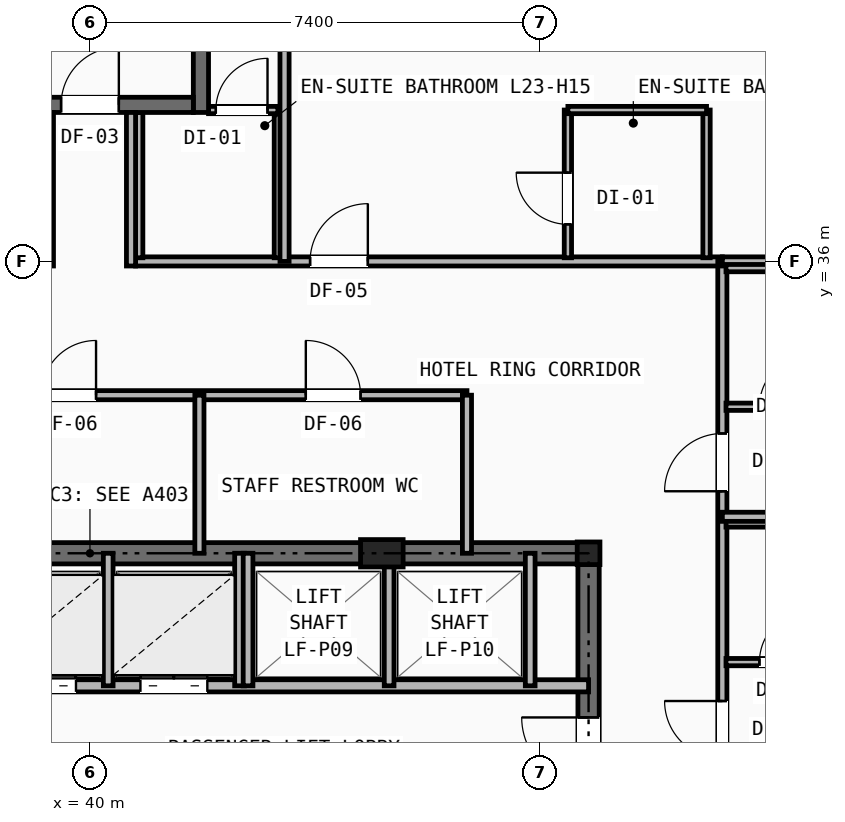
"""IFC4 building model, lengths in metres.
Left out: names, types, materials, properties, quantities, classifications, styles, units other than length and angle.
Written with IfcOpenShell. Run it as: python <this file> out.ifc"""

import sys

from ifc_helpers import new_model, si_unit, direction, frame, frame_2d, origin, origin_2d, place, context, subcontext, project, spatial, rectangle, i_section, extrude, element, fill, save


model = new_model("IFC4")
c1 = context("Model", 3, precision=1e-05, world=origin(), true_north=direction((0.0, 1.0)))
c2 = subcontext(c1, "Body", "Model", "MODEL_VIEW")
j1 = project(units=[si_unit("LENGTHUNIT", "METRE"), si_unit("PLANEANGLEUNIT", "RADIAN")], contexts=[c1])
p1 = place(None, origin())
s1 = spatial("IfcSite", under=j1, at=p1, CompositionType="ELEMENT")
p2 = place(p1, origin())
s2 = spatial("IfcBuilding", under=s1, at=p2, CompositionType="ELEMENT")
p3 = place(p2, frame((0.0, 0.0, 83.0)))
s3 = spatial("IfcBuildingStorey", under=s2, at=p3, CompositionType="ELEMENT", Elevation=83.0)
p4 = place(p3, frame((48.2, 31.2, 0.0), z_axis=(0.0, 0.0, 1.0), x_axis=(1.0, 0.0, 0.0)))
e1 = element("IfcColumn", 1, at=p4, inside=s3, PredefinedType="COLUMN", context=c2, shape_type="SweptSolid", body=[
    extrude(i_section(OverallWidth=0.374, OverallDepth=0.372, WebThickness=0.016, FlangeThickness=0.026, at=origin_2d()), origin(), (0.0, 0.0, 1.0), 3.2),
])
p5 = place(p3, frame((44.8, 31.2, 0.0), z_axis=(0.0, 0.0, 1.0), x_axis=(1.0, 0.0, 0.0)))
e2 = element("IfcColumn", 2, at=p5, inside=s3, PredefinedType="PILASTER", context=c2, shape_type="SweptSolid", body=[
    extrude(rectangle(XDim=0.7, YDim=0.45, at=origin_2d()), origin(), (0.0, 0.0, 1.0), 3.2),
])
p6 = place(p3, frame((31.8, 31.2, 0.0), z_axis=(0.0, 0.0, 1.0), x_axis=(1.0, 0.0, 0.0)))
e3 = element("IfcWall", 3, at=p6, inside=s3, PredefinedType="SHEAR", context=c2, shape_type="SweptSolid", body=[
    extrude(rectangle(XDim=16.4, YDim=0.35, at=frame_2d((8.2, 0.0))), origin(), (0.0, 0.0, 1.0), 2.97),
])
p7 = place(p3, frame((48.2, 16.4, 0.0), z_axis=(0.0, 0.0, 1.0), x_axis=(0.0, 1.0, 0.0)))
e4 = element("IfcWall", 4, at=p7, inside=s3, PredefinedType="SHEAR", context=c2, shape_type="SweptSolid", body=[
    extrude(rectangle(XDim=14.8, YDim=0.35, at=frame_2d((7.4, 0.0))), origin(), (0.0, 0.0, 1.0), 2.97),
])
p8 = place(p7, frame((11.0, 0.0, 0.0)))
e5 = element("IfcOpeningElement", 5, at=p8, cuts=e4, PredefinedType="OPENING", context=c2, shape_type="SweptSolid", body=[
    extrude(rectangle(XDim=1.1, YDim=2.15, at=frame_2d((0.55, 1.075))), frame((0.0, 0.185, 0.0), z_axis=(0.0, -1.0, 0.0), x_axis=(1.0, 0.0, 0.0)), (0.0, 0.0, 1.0), 0.37),
])
p9 = place(p3, frame((31.8, 29.02, 0.0), z_axis=(0.0, 0.0, 1.0), x_axis=(1.0, 0.0, 0.0)))
e6 = element("IfcWall", 6, at=p9, inside=s3, PredefinedType="SOLIDWALL", context=c2, shape_type="SweptSolid", body=[
    extrude(rectangle(XDim=16.4, YDim=0.2, at=frame_2d((8.2, 0.0))), origin(), (0.0, 0.0, 1.0), 2.421),
])
p10 = place(p9, frame((0.55, 0.0, 0.0)))
e7 = element("IfcOpeningElement", 7, at=p10, cuts=e6, PredefinedType="OPENING", context=c2, shape_type="SweptSolid", body=[
    extrude(rectangle(XDim=0.85, YDim=2.05, at=frame_2d((0.425, 1.025))), frame((0.0, 0.11, 0.0), z_axis=(0.0, -1.0, 0.0), x_axis=(1.0, 0.0, 0.0)), (0.0, 0.0, 1.0), 0.22),
])
p11 = place(p9, frame((2.55, 0.0, 0.0)))
e8 = element("IfcOpeningElement", 8, at=p11, cuts=e6, PredefinedType="OPENING", context=c2, shape_type="SweptSolid", body=[
    extrude(rectangle(XDim=1.1, YDim=2.15, at=frame_2d((0.55, 1.075))), frame((0.0, 0.11, 0.0), z_axis=(0.0, -1.0, 0.0), x_axis=(1.0, 0.0, 0.0)), (0.0, 0.0, 1.0), 0.22),
])
p12 = place(p9, frame((4.71, 0.0, 0.0)))
e9 = element("IfcOpeningElement", 9, at=p12, cuts=e6, PredefinedType="OPENING", context=c2, shape_type="SweptSolid", body=[
    extrude(rectangle(XDim=1.1, YDim=2.15, at=frame_2d((0.55, 1.075))), frame((0.0, 0.11, 0.0), z_axis=(0.0, -1.0, 0.0), x_axis=(1.0, 0.0, 0.0)), (0.0, 0.0, 1.0), 0.22),
])
p13 = place(p9, frame((6.87, 0.0, 0.0)))
e10 = element("IfcOpeningElement", 10, at=p13, cuts=e6, PredefinedType="OPENING", context=c2, shape_type="SweptSolid", body=[
    extrude(rectangle(XDim=1.1, YDim=2.15, at=frame_2d((0.55, 1.075))), frame((0.0, 0.11, 0.0), z_axis=(0.0, -1.0, 0.0), x_axis=(1.0, 0.0, 0.0)), (0.0, 0.0, 1.0), 0.22),
])
p14 = place(p9, frame((9.03, 0.0, 0.0)))
e11 = element("IfcOpeningElement", 11, at=p14, cuts=e6, PredefinedType="OPENING", context=c2, shape_type="SweptSolid", body=[
    extrude(rectangle(XDim=1.1, YDim=2.15, at=frame_2d((0.55, 1.075))), frame((0.0, 0.11, 0.0), z_axis=(0.0, -1.0, 0.0), x_axis=(1.0, 0.0, 0.0)), (0.0, 0.0, 1.0), 0.22),
])
for number, where, z_axis, x_axis in (
    (12, (40.3, 29.02, 0.0), (0.0, 0.0, 1.0), (0.0, 1.0, 0.0)),
    (13, (42.46, 29.02, 0.0), (0.0, 0.0, 1.0), (0.0, 1.0, 0.0)),
    (14, (42.6, 29.02, 0.0), (0.0, 0.0, 1.0), (0.0, 1.0, 0.0)),
    (15, (44.92, 29.02, 0.0), (0.0, 0.0, 1.0), (0.0, 1.0, 0.0)),
    (16, (47.24, 29.02, 0.0), (0.0, 0.0, 1.0), (0.0, 1.0, 0.0)),
):
    element("IfcWall", number, at=place(p3, frame(where, z_axis=z_axis, x_axis=x_axis)), inside=s3, PredefinedType="SOLIDWALL", context=c2, shape_type="SweptSolid", body=[
        extrude(rectangle(XDim=2.18, YDim=0.16, at=frame_2d((1.09, 0.0))), origin(), (0.0, 0.0, 1.0), 2.421),
    ])
p15 = place(p3, frame((33.2, 33.8, 0.0), z_axis=(0.0, 0.0, 1.0), x_axis=(1.0, 0.0, 0.0)))
e17 = element("IfcWall", 17, at=p15, inside=s3, PredefinedType="PARTITIONING", context=c2, shape_type="SweptSolid", body=[
    extrude(rectangle(XDim=13.0, YDim=0.15, at=frame_2d((6.5, 0.0))), origin(), (0.0, 0.0, 1.0), 2.97),
])
p16 = place(p15, frame((1.7, 0.0, 0.0)))
e18 = element("IfcOpeningElement", 18, at=p16, cuts=e17, PredefinedType="OPENING", context=c2, shape_type="SweptSolid", body=[
    extrude(rectangle(XDim=0.9, YDim=2.1, at=frame_2d((0.45, 1.05))), frame((0.0, 0.085, 0.0), z_axis=(0.0, -1.0, 0.0), x_axis=(1.0, 0.0, 0.0)), (0.0, 0.0, 1.0), 0.17),
])
p17 = place(p15, frame((6.0, 0.0, 0.0)))
e19 = element("IfcOpeningElement", 19, at=p17, cuts=e17, PredefinedType="OPENING", context=c2, shape_type="SweptSolid", body=[
    extrude(rectangle(XDim=0.9, YDim=2.1, at=frame_2d((0.45, 1.05))), frame((0.0, 0.085, 0.0), z_axis=(0.0, -1.0, 0.0), x_axis=(1.0, 0.0, 0.0)), (0.0, 0.0, 1.0), 0.17),
])
p18 = place(p15, frame((10.35, 0.0, 0.0)))
e20 = element("IfcOpeningElement", 20, at=p18, cuts=e17, PredefinedType="OPENING", context=c2, shape_type="SweptSolid", body=[
    extrude(rectangle(XDim=0.9, YDim=2.1, at=frame_2d((0.45, 1.05))), frame((0.0, 0.085, 0.0), z_axis=(0.0, -1.0, 0.0), x_axis=(1.0, 0.0, 0.0)), (0.0, 0.0, 1.0), 0.17),
])
for number, where, z_axis, x_axis in (
    (21, (46.2, 31.2, 0.0), (0.0, 0.0, 1.0), (0.0, 1.0, 0.0)),
    (22, (41.8, 31.2, 0.0), (0.0, 0.0, 1.0), (0.0, 1.0, 0.0)),
):
    element("IfcWall", number, at=place(p3, frame(where, z_axis=z_axis, x_axis=x_axis)), inside=s3, PredefinedType="PARTITIONING", context=c2, shape_type="SweptSolid", body=[
        extrude(rectangle(XDim=2.6, YDim=0.15, at=frame_2d((1.3, 0.0))), origin(), (0.0, 0.0, 1.0), 2.421),
    ])
p19 = place(p3, frame((40.75, 36.0, 0.0), z_axis=(0.0, 0.0, 1.0), x_axis=(1.0, 0.0, 0.0)))
e23 = element("IfcWall", 23, at=p19, inside=s3, PredefinedType="PARTITIONING", context=c2, shape_type="SweptSolid", body=[
    extrude(rectangle(XDim=9.65, YDim=0.15, at=frame_2d((4.825, 0.0))), origin(), (0.0, 0.0, 1.0), 2.503),
])
p20 = place(p19, frame((2.87, 0.0, 0.0)))
e24 = element("IfcOpeningElement", 24, at=p20, cuts=e23, PredefinedType="OPENING", context=c2, shape_type="SweptSolid", body=[
    extrude(rectangle(XDim=0.95, YDim=2.1, at=frame_2d((0.475, 1.05))), frame((0.0, 0.085, 0.0), z_axis=(0.0, -1.0, 0.0), x_axis=(1.0, 0.0, 0.0)), (0.0, 0.0, 1.0), 0.17),
])
p21 = place(p3, frame((50.4, 14.1, 0.0), z_axis=(0.0, 0.0, 1.0), x_axis=(0.0, 1.0, 0.0)))
e25 = element("IfcWall", 25, at=p21, inside=s3, PredefinedType="PARTITIONING", context=c2, shape_type="SweptSolid", body=[
    extrude(rectangle(XDim=21.9, YDim=0.15, at=frame_2d((10.95, 0.0))), origin(), (0.0, 0.0, 1.0), 2.421),
])
p22 = place(p21, frame((0.42, 0.0, 0.0)))
e26 = element("IfcOpeningElement", 26, at=p22, cuts=e25, PredefinedType="OPENING", context=c2, shape_type="SweptSolid", body=[
    extrude(rectangle(XDim=0.95, YDim=2.1, at=frame_2d((0.475, 1.05))), frame((0.0, 0.085, 0.0), z_axis=(0.0, -1.0, 0.0), x_axis=(1.0, 0.0, 0.0)), (0.0, 0.0, 1.0), 0.17),
])
p23 = place(p21, frame((4.72, 0.0, 0.0)))
e27 = element("IfcOpeningElement", 27, at=p23, cuts=e25, PredefinedType="OPENING", context=c2, shape_type="SweptSolid", body=[
    extrude(rectangle(XDim=0.95, YDim=2.1, at=frame_2d((0.475, 1.05))), frame((0.0, 0.085, 0.0), z_axis=(0.0, -1.0, 0.0), x_axis=(1.0, 0.0, 0.0)), (0.0, 0.0, 1.0), 0.17),
])
p24 = place(p21, frame((9.12, 0.0, 0.0)))
e28 = element("IfcOpeningElement", 28, at=p24, cuts=e25, PredefinedType="OPENING", context=c2, shape_type="SweptSolid", body=[
    extrude(rectangle(XDim=0.95, YDim=2.1, at=frame_2d((0.475, 1.05))), frame((0.0, 0.085, 0.0), z_axis=(0.0, -1.0, 0.0), x_axis=(1.0, 0.0, 0.0)), (0.0, 0.0, 1.0), 0.17),
])
p25 = place(p21, frame((13.72, 0.0, 0.0)))
e29 = element("IfcOpeningElement", 29, at=p25, cuts=e25, PredefinedType="OPENING", context=c2, shape_type="SweptSolid", body=[
    extrude(rectangle(XDim=0.95, YDim=2.1, at=frame_2d((0.475, 1.05))), frame((0.0, 0.085, 0.0), z_axis=(0.0, -1.0, 0.0), x_axis=(1.0, 0.0, 0.0)), (0.0, 0.0, 1.0), 0.17),
])
p26 = place(p21, frame((18.12, 0.0, 0.0)))
e30 = element("IfcOpeningElement", 30, at=p26, cuts=e25, PredefinedType="OPENING", context=c2, shape_type="SweptSolid", body=[
    extrude(rectangle(XDim=0.95, YDim=2.1, at=frame_2d((0.475, 1.05))), frame((0.0, 0.085, 0.0), z_axis=(0.0, -1.0, 0.0), x_axis=(1.0, 0.0, 0.0)), (0.0, 0.0, 1.0), 0.17),
])
p27 = place(p3, frame((50.4, 36.0, 0.0), z_axis=(0.0, 0.0, 1.0), x_axis=(1.0, 0.0, 0.0)))
e31 = element("IfcWall", 31, at=p27, inside=s3, PredefinedType="PARTITIONING", context=c2, shape_type="SweptSolid", body=[
    extrude(rectangle(XDim=5.645, YDim=0.15, at=frame_2d((2.823, 0.0))), origin(), (0.0, 0.0, 1.0), 2.258),
])
p28 = place(p3, frame((50.46, 29.41, 0.0), z_axis=(0.0, 0.0, 1.0), x_axis=(1.0, 0.0, 0.0)))
e32 = element("IfcWall", 32, at=p28, inside=s3, PredefinedType="PARTITIONING", context=c2, shape_type="SweptSolid", body=[
    extrude(rectangle(XDim=2.43, YDim=0.12, at=frame_2d((1.215, 0.0))), origin(), (0.0, 0.0, 1.0), 2.97),
])
p29 = place(p28, frame((0.55, 0.0, 0.0)))
e33 = element("IfcOpeningElement", 33, at=p29, cuts=e32, PredefinedType="OPENING", context=c2, shape_type="SweptSolid", body=[
    extrude(rectangle(XDim=0.85, YDim=2.05, at=frame_2d((0.425, 1.025))), frame((0.0, 0.07, 0.0), z_axis=(0.0, -1.0, 0.0), x_axis=(1.0, 0.0, 0.0)), (0.0, 0.0, 1.0), 0.14),
])
p30 = place(p3, frame((50.46, 31.69, 0.0), z_axis=(0.0, 0.0, 1.0), x_axis=(1.0, 0.0, 0.0)))
e34 = element("IfcWall", 34, at=p30, inside=s3, PredefinedType="PARTITIONING", context=c2, shape_type="SweptSolid", body=[
    extrude(rectangle(XDim=2.43, YDim=0.12, at=frame_2d((1.215, 0.0))), origin(), (0.0, 0.0, 1.0), 2.421),
])
p31 = place(p3, frame((50.4, 31.8, 0.0), z_axis=(0.0, 0.0, 1.0), x_axis=(1.0, 0.0, 0.0)))
e35 = element("IfcWall", 35, at=p31, inside=s3, PredefinedType="PARTITIONING", context=c2, shape_type="SweptSolid", body=[
    extrude(rectangle(XDim=8.046, YDim=0.15, at=frame_2d((4.023, 0.0))), origin(), (0.0, 0.0, 1.0), 2.258),
])
p32 = place(p3, frame((50.46, 33.61, 0.0), z_axis=(0.0, 0.0, 1.0), x_axis=(1.0, 0.0, 0.0)))
e36 = element("IfcWall", 36, at=p32, inside=s3, PredefinedType="PARTITIONING", context=c2, shape_type="SweptSolid", body=[
    extrude(rectangle(XDim=2.43, YDim=0.12, at=frame_2d((1.215, 0.0))), origin(), (0.0, 0.0, 1.0), 2.503),
])
p33 = place(p32, frame((0.55, 0.0, 0.0)))
e37 = element("IfcOpeningElement", 37, at=p33, cuts=e36, PredefinedType="OPENING", context=c2, shape_type="SweptSolid", body=[
    extrude(rectangle(XDim=0.85, YDim=2.05, at=frame_2d((0.425, 1.025))), frame((0.0, 0.07, 0.0), z_axis=(0.0, -1.0, 0.0), x_axis=(1.0, 0.0, 0.0)), (0.0, 0.0, 1.0), 0.14),
])
p34 = place(p3, frame((50.46, 35.89, 0.0), z_axis=(0.0, 0.0, 1.0), x_axis=(1.0, 0.0, 0.0)))
e38 = element("IfcWall", 38, at=p34, inside=s3, PredefinedType="PARTITIONING", context=c2, shape_type="SweptSolid", body=[
    extrude(rectangle(XDim=2.43, YDim=0.12, at=frame_2d((1.215, 0.0))), origin(), (0.0, 0.0, 1.0), 2.97),
])
p35 = place(p3, frame((40.81, 36.06, 0.0), z_axis=(0.0, 0.0, 1.0), x_axis=(0.0, 1.0, 0.0)))
e39 = element("IfcWall", 39, at=p35, inside=s3, PredefinedType="PARTITIONING", context=c2, shape_type="SweptSolid", body=[
    extrude(rectangle(XDim=2.39, YDim=0.12, at=frame_2d((1.195, 0.0))), origin(), (0.0, 0.0, 1.0), 2.97),
])
p36 = place(p3, frame((43.09, 36.06, 0.0), z_axis=(0.0, 0.0, 1.0), x_axis=(0.0, 1.0, 0.0)))
e40 = element("IfcWall", 40, at=p36, inside=s3, PredefinedType="PARTITIONING", context=c2, shape_type="SweptSolid", body=[
    extrude(rectangle(XDim=2.43, YDim=0.12, at=frame_2d((1.215, 0.0))), origin(), (0.0, 0.0, 1.0), 2.97),
])
p37 = place(p3, frame((41.95, 38.49, 0.0), z_axis=(0.0, 0.0, 1.0), x_axis=(1.0, 0.0, 0.0)))
e41 = element("IfcWall", 41, at=p37, inside=s3, PredefinedType="PARTITIONING", context=c2, shape_type="SweptSolid", body=[
    extrude(rectangle(XDim=1.14, YDim=0.12, at=frame_2d((0.57, 0.0))), origin(), (0.0, 0.0, 1.0), 2.97),
])
p38 = place(p37, frame((0.12, 0.0, 0.0)))
e42 = element("IfcOpeningElement", 42, at=p38, cuts=e41, PredefinedType="OPENING", context=c2, shape_type="SweptSolid", body=[
    extrude(rectangle(XDim=0.85, YDim=2.05, at=frame_2d((0.425, 1.025))), frame((0.0, 0.07, 0.0), z_axis=(0.0, -1.0, 0.0), x_axis=(1.0, 0.0, 0.0)), (0.0, 0.0, 1.0), 0.14),
])
p39 = place(p3, frame((43.2, 36.0, 0.0), z_axis=(0.0, 0.0, 1.0), x_axis=(0.0, 1.0, 0.0)))
e43 = element("IfcWall", 43, at=p39, inside=s3, PredefinedType="PARTITIONING", context=c2, shape_type="SweptSolid", body=[
    extrude(rectangle(XDim=17.746, YDim=0.15, at=frame_2d((8.873, 0.0))), origin(), (0.0, 0.0, 1.0), 2.258),
])
p40 = place(p3, frame((47.86, 36.06, 0.0), z_axis=(0.0, 0.0, 1.0), x_axis=(0.0, 1.0, 0.0)))
e44 = element("IfcWall", 44, at=p40, inside=s3, PredefinedType="PARTITIONING", context=c2, shape_type="SweptSolid", body=[
    extrude(rectangle(XDim=2.43, YDim=0.12, at=frame_2d((1.215, 0.0))), origin(), (0.0, 0.0, 1.0), 2.503),
])
p41 = place(p40, frame((0.55, 0.0, 0.0)))
e45 = element("IfcOpeningElement", 45, at=p41, cuts=e44, PredefinedType="OPENING", context=c2, shape_type="SweptSolid", body=[
    extrude(rectangle(XDim=0.85, YDim=2.05, at=frame_2d((0.425, 1.025))), frame((0.0, 0.07, 0.0), z_axis=(0.0, -1.0, 0.0), x_axis=(1.0, 0.0, 0.0)), (0.0, 0.0, 1.0), 0.14),
])
p42 = place(p3, frame((50.14, 36.06, 0.0), z_axis=(0.0, 0.0, 1.0), x_axis=(0.0, 1.0, 0.0)))
e46 = element("IfcWall", 46, at=p42, inside=s3, PredefinedType="PARTITIONING", context=c2, shape_type="SweptSolid", body=[
    extrude(rectangle(XDim=2.43, YDim=0.12, at=frame_2d((1.215, 0.0))), origin(), (0.0, 0.0, 1.0), 2.97),
])
p43 = place(p3, frame((47.86, 38.49, 0.0), z_axis=(0.0, 0.0, 1.0), x_axis=(1.0, 0.0, 0.0)))
e47 = element("IfcWall", 47, at=p43, inside=s3, PredefinedType="PARTITIONING", context=c2, shape_type="SweptSolid", body=[
    extrude(rectangle(XDim=2.28, YDim=0.12, at=frame_2d((1.14, 0.0))), origin(), (0.0, 0.0, 1.0), 2.503),
])
p44 = place(p3, frame((41.825, 38.45, 0.0), z_axis=(0.0, 0.0, 1.0), x_axis=(0.0, 1.0, 0.0)))
e48 = element("IfcWall", 48, at=p44, inside=s3, PredefinedType="SHEAR", context=c2, shape_type="SweptSolid", body=[
    extrude(rectangle(XDim=8.55, YDim=0.25, at=frame_2d((4.275, 0.0))), origin(), (0.0, 0.0, 1.0), 2.97),
])
p45 = place(p3, frame((38.3, 38.575, 0.0), z_axis=(0.0, 0.0, 1.0), x_axis=(1.0, 0.0, 0.0)))
e49 = element("IfcWall", 49, at=p45, inside=s3, PredefinedType="SHEAR", context=c2, shape_type="SweptSolid", body=[
    extrude(rectangle(XDim=3.4, YDim=0.25, at=frame_2d((1.7, 0.0))), origin(), (0.0, 0.0, 1.0), 2.97),
])
p46 = place(p45, frame((1.225, 0.0, 0.0)))
e50 = element("IfcOpeningElement", 50, at=p46, cuts=e49, PredefinedType="OPENING", context=c2, shape_type="SweptSolid", body=[
    extrude(rectangle(XDim=0.95, YDim=2.1, at=frame_2d((0.475, 1.05))), frame((0.0, 0.135, 0.0), z_axis=(0.0, -1.0, 0.0), x_axis=(1.0, 0.0, 0.0)), (0.0, 0.0, 1.0), 0.27),
])
for number, where, z_axis, x_axis in (
    (51, (39.325, 35.925, 0.0), (0.0, 0.0, 1.0), (0.0, 1.0, 0.0)),
    (52, (40.675, 35.925, 0.0), (0.0, 0.0, 1.0), (0.0, 1.0, 0.0)),
):
    element("IfcWall", number, at=place(p3, frame(where, z_axis=z_axis, x_axis=x_axis)), inside=s3, PredefinedType="PARTITIONING", context=c2, shape_type="SweptSolid", body=[
        extrude(rectangle(XDim=2.525, YDim=0.15, at=frame_2d((1.262, 0.0))), origin(), (0.0, 0.0, 1.0), 2.97),
    ])
p47 = place(p8, origin())
e53 = element("IfcDoor", 53, at=p47, inside=s3, OperationType="SINGLE_SWING_RIGHT", PredefinedType="DOOR", context=c2, shape_type="SweptSolid", body=[
    extrude(rectangle(XDim=1.1, YDim=2.15, at=frame_2d((0.55, 1.075))), frame((0.0, 0.025, 0.0), z_axis=(0.0, -1.0, 0.0), x_axis=(1.0, 0.0, 0.0)), (0.0, 0.0, 1.0), 0.05),
])
fill(e5, e53)
p48 = place(p13, origin())
e54 = element("IfcDoor", 54, at=p48, inside=s3, OperationType="DOUBLE_DOOR_SLIDING", PredefinedType="DOOR", context=c2, shape_type="SweptSolid", body=[
    extrude(rectangle(XDim=1.1, YDim=2.15, at=frame_2d((0.55, 1.075))), frame((0.0, 0.025, 0.0), z_axis=(0.0, -1.0, 0.0), x_axis=(1.0, 0.0, 0.0)), (0.0, 0.0, 1.0), 0.05),
])
fill(e10, e54)
p49 = place(p14, origin())
e55 = element("IfcDoor", 55, at=p49, inside=s3, OperationType="DOUBLE_DOOR_SLIDING", PredefinedType="DOOR", context=c2, shape_type="SweptSolid", body=[
    extrude(rectangle(XDim=1.1, YDim=2.15, at=frame_2d((0.55, 1.075))), frame((0.0, 0.025, 0.0), z_axis=(0.0, -1.0, 0.0), x_axis=(1.0, 0.0, 0.0)), (0.0, 0.0, 1.0), 0.05),
])
fill(e11, e55)
p50 = place(p17, origin())
e56 = element("IfcDoor", 56, at=p50, inside=s3, OperationType="SINGLE_SWING_RIGHT", PredefinedType="DOOR", context=c2, shape_type="SweptSolid", body=[
    extrude(rectangle(XDim=0.9, YDim=2.1, at=frame_2d((0.45, 1.05))), frame((0.0, 0.025, 0.0), z_axis=(0.0, -1.0, 0.0), x_axis=(1.0, 0.0, 0.0)), (0.0, 0.0, 1.0), 0.05),
])
fill(e19, e56)
p51 = place(p18, origin())
e57 = element("IfcDoor", 57, at=p51, inside=s3, OperationType="SINGLE_SWING_LEFT", PredefinedType="DOOR", context=c2, shape_type="SweptSolid", body=[
    extrude(rectangle(XDim=0.9, YDim=2.1, at=frame_2d((0.45, 1.05))), frame((0.0, 0.025, 0.0), z_axis=(0.0, -1.0, 0.0), x_axis=(1.0, 0.0, 0.0)), (0.0, 0.0, 1.0), 0.05),
])
fill(e20, e57)
p52 = place(p25, origin())
e58 = element("IfcDoor", 58, at=p52, inside=s3, OperationType="SINGLE_SWING_RIGHT", PredefinedType="DOOR", context=c2, shape_type="SweptSolid", body=[
    extrude(rectangle(XDim=0.95, YDim=2.1, at=frame_2d((0.475, 1.05))), frame((0.0, 0.025, 0.0), z_axis=(0.0, -1.0, 0.0), x_axis=(1.0, 0.0, 0.0)), (0.0, 0.0, 1.0), 0.05),
])
fill(e29, e58)
p53 = place(p29, origin())
e59 = element("IfcDoor", 59, at=p53, inside=s3, OperationType="SINGLE_SWING_RIGHT", PredefinedType="DOOR", context=c2, shape_type="SweptSolid", body=[
    extrude(rectangle(XDim=0.85, YDim=2.05, at=frame_2d((0.425, 1.025))), frame((0.0, 0.025, 0.0), z_axis=(0.0, -1.0, 0.0), x_axis=(1.0, 0.0, 0.0)), (0.0, 0.0, 1.0), 0.05),
])
fill(e33, e59)
p54 = place(p26, origin())
e60 = element("IfcDoor", 60, at=p54, inside=s3, OperationType="SINGLE_SWING_LEFT", PredefinedType="DOOR", context=c2, shape_type="SweptSolid", body=[
    extrude(rectangle(XDim=0.95, YDim=2.1, at=frame_2d((0.475, 1.05))), frame((0.0, 0.025, 0.0), z_axis=(0.0, -1.0, 0.0), x_axis=(1.0, 0.0, 0.0)), (0.0, 0.0, 1.0), 0.05),
])
fill(e30, e60)
p55 = place(p33, origin())
e61 = element("IfcDoor", 61, at=p55, inside=s3, OperationType="SINGLE_SWING_RIGHT", PredefinedType="DOOR", context=c2, shape_type="SweptSolid", body=[
    extrude(rectangle(XDim=0.85, YDim=2.05, at=frame_2d((0.425, 1.025))), frame((0.0, 0.025, 0.0), z_axis=(0.0, -1.0, 0.0), x_axis=(1.0, 0.0, 0.0)), (0.0, 0.0, 1.0), 0.05),
])
fill(e37, e61)
p56 = place(p38, origin())
e62 = element("IfcDoor", 62, at=p56, inside=s3, OperationType="SINGLE_SWING_RIGHT", PredefinedType="DOOR", context=c2, shape_type="SweptSolid", body=[
    extrude(rectangle(XDim=0.85, YDim=2.05, at=frame_2d((0.425, 1.025))), frame((0.0, 0.025, 0.0), z_axis=(0.0, -1.0, 0.0), x_axis=(1.0, 0.0, 0.0)), (0.0, 0.0, 1.0), 0.05),
])
fill(e42, e62)
p57 = place(p20, origin())
e63 = element("IfcDoor", 63, at=p57, inside=s3, OperationType="SINGLE_SWING_RIGHT", PredefinedType="DOOR", context=c2, shape_type="SweptSolid", body=[
    extrude(rectangle(XDim=0.95, YDim=2.1, at=frame_2d((0.475, 1.05))), frame((0.0, 0.025, 0.0), z_axis=(0.0, -1.0, 0.0), x_axis=(1.0, 0.0, 0.0)), (0.0, 0.0, 1.0), 0.05),
])
fill(e24, e63)
p58 = place(p41, origin())
e64 = element("IfcDoor", 64, at=p58, inside=s3, OperationType="SINGLE_SWING_RIGHT", PredefinedType="DOOR", context=c2, shape_type="SweptSolid", body=[
    extrude(rectangle(XDim=0.85, YDim=2.05, at=frame_2d((0.425, 1.025))), frame((0.0, 0.025, 0.0), z_axis=(0.0, -1.0, 0.0), x_axis=(1.0, 0.0, 0.0)), (0.0, 0.0, 1.0), 0.05),
])
fill(e45, e64)
p59 = place(p46, origin())
e65 = element("IfcDoor", 65, at=p59, inside=s3, OperationType="SINGLE_SWING_RIGHT", PredefinedType="DOOR", context=c2, shape_type="SweptSolid", body=[
    extrude(rectangle(XDim=0.95, YDim=2.1, at=frame_2d((0.475, 1.05))), frame((0.0, 0.025, 0.0), z_axis=(0.0, -1.0, 0.0), x_axis=(1.0, 0.0, 0.0)), (0.0, 0.0, 1.0), 0.05),
])
fill(e50, e65)
save(model, sys.argv[1])
